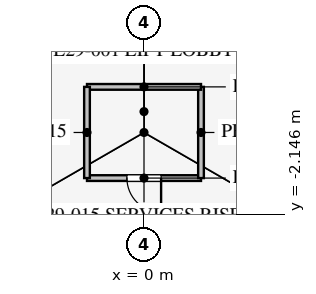
"""IFC4 building model, lengths in metres.
Left out: names, types, materials, properties, quantities, classifications, styles, units other than length and angle.
Written with IfcOpenShell. Run it as: python <this file> out.ifc"""

import sys

from ifc_helpers import new_model, si_unit, direction, frame, frame_2d, origin, place, context, subcontext, project, spatial, rectangle, extrude, element, fill, save


model = new_model("IFC4")
c1 = context("Model", 3, precision=1e-05, world=origin(), true_north=direction((0.0, 1.0)))
c2 = subcontext(c1, "Body", "Model", "MODEL_VIEW")
j1 = project(units=[si_unit("LENGTHUNIT", "METRE"), si_unit("PLANEANGLEUNIT", "RADIAN")], contexts=[c1])
p1 = place(None, origin())
s1 = spatial("IfcSite", under=j1, at=p1, CompositionType="ELEMENT")
p2 = place(p1, origin())
s2 = spatial("IfcBuilding", under=s1, at=p2, CompositionType="ELEMENT")
p3 = place(p2, frame((0.0, 0.0, 128.3)))
s3 = spatial("IfcBuildingStorey", under=s2, at=p3, CompositionType="ELEMENT", Elevation=128.3)
p4 = place(p3, frame((-1.5, -1.2, 0.0), z_axis=(0.0, 0.0, 1.0), x_axis=(1.0, 0.0, 0.0)))
e1 = element("IfcWall", 1, at=p4, inside=s3, PredefinedType="PARTITIONING", context=c2, shape_type="SweptSolid", body=[
    extrude(rectangle(XDim=3.0, YDim=0.15, at=frame_2d((1.5, 0.0))), origin(), (0.0, 0.0, 1.0), 4.0),
])
p5 = place(p4, frame((1.05, 0.0, 0.0)))
e2 = element("IfcOpeningElement", 2, at=p5, cuts=e1, PredefinedType="OPENING", context=c2, shape_type="SweptSolid", body=[
    extrude(rectangle(XDim=0.9, YDim=2.1, at=frame_2d((0.45, 1.05))), frame((0.0, 0.085, 0.0), z_axis=(0.0, -1.0, 0.0), x_axis=(1.0, 0.0, 0.0)), (0.0, 0.0, 1.0), 0.17),
])
p6 = place(p3, frame((1.5, -1.2, 0.0), z_axis=(0.0, 0.0, 1.0), x_axis=(0.0, 1.0, 0.0)))
e3 = element("IfcWall", 3, at=p6, inside=s3, PredefinedType="PARTITIONING", context=c2, shape_type="SweptSolid", body=[
    extrude(rectangle(XDim=2.4, YDim=0.15, at=frame_2d((1.2, 0.0))), origin(), (0.0, 0.0, 1.0), 4.0),
])
p7 = place(p3, frame((1.5, 1.2, 0.0), z_axis=(0.0, 0.0, 1.0), x_axis=(-1.0, 0.0, 0.0)))
e4 = element("IfcWall", 4, at=p7, inside=s3, PredefinedType="PARTITIONING", context=c2, shape_type="SweptSolid", body=[
    extrude(rectangle(XDim=3.0, YDim=0.15, at=frame_2d((1.5, 0.0))), origin(), (0.0, 0.0, 1.0), 4.0),
])
p8 = place(p3, frame((-1.5, 1.2, 0.0), z_axis=(0.0, 0.0, 1.0), x_axis=(0.0, -1.0, 0.0)))
e5 = element("IfcWall", 5, at=p8, inside=s3, PredefinedType="PARTITIONING", context=c2, shape_type="SweptSolid", body=[
    extrude(rectangle(XDim=2.4, YDim=0.15, at=frame_2d((1.2, 0.0))), origin(), (0.0, 0.0, 1.0), 4.0),
])
p9 = place(p3, frame((26.415, -15.231, 0.0), z_axis=(0.0, 0.0, 1.0), x_axis=(-0.50000091641, 0.866024874695, 0.0)))
e6 = element("IfcWall", 6, at=p9, inside=s3, PredefinedType="PARTITIONING", context=c2, shape_type="SweptSolid", body=[
    extrude(rectangle(XDim=52.796, YDim=0.12, at=frame_2d((26.398, 0.0))), origin(), (0.0, 0.0, 1.0), 2.9),
])
p10 = place(p9, frame((10.2, 0.0, 0.15)))
e7 = element("IfcOpeningElement", 7, at=p10, cuts=e6, PredefinedType="OPENING", context=c2, shape_type="SweptSolid", body=[
    extrude(rectangle(XDim=1.8, YDim=2.1, at=frame_2d((0.9, 1.05))), frame((0.0, 0.07, 0.0), z_axis=(0.0, -1.0, 0.0), x_axis=(1.0, 0.0, 0.0)), (0.0, 0.0, 1.0), 0.14),
])
p11 = place(p9, frame((40.8, 0.0, 0.15)))
e8 = element("IfcOpeningElement", 8, at=p11, cuts=e6, PredefinedType="OPENING", context=c2, shape_type="SweptSolid", body=[
    extrude(rectangle(XDim=1.8, YDim=2.1, at=frame_2d((0.9, 1.05))), frame((0.0, 0.07, 0.0), z_axis=(0.0, -1.0, 0.0), x_axis=(1.0, 0.0, 0.0)), (0.0, 0.0, 1.0), 0.14),
])
p12 = place(p3, frame((-0.016, 30.491, 0.0), z_axis=(0.0, 0.0, 1.0), x_axis=(-0.50000091641, -0.866024874695, 0.0)))
e9 = element("IfcWall", 9, at=p12, inside=s3, PredefinedType="PARTITIONING", context=c2, shape_type="SweptSolid", body=[
    extrude(rectangle(XDim=52.796, YDim=0.12, at=frame_2d((26.398, 0.0))), origin(), (0.0, 0.0, 1.0), 2.9),
])
p13 = place(p12, frame((10.2, 0.0, 0.15)))
e10 = element("IfcOpeningElement", 10, at=p13, cuts=e9, PredefinedType="OPENING", context=c2, shape_type="SweptSolid", body=[
    extrude(rectangle(XDim=1.8, YDim=2.1, at=frame_2d((0.9, 1.05))), frame((0.0, 0.07, 0.0), z_axis=(0.0, -1.0, 0.0), x_axis=(1.0, 0.0, 0.0)), (0.0, 0.0, 1.0), 0.14),
])
p14 = place(p12, frame((40.8, 0.0, 0.15)))
e11 = element("IfcOpeningElement", 11, at=p14, cuts=e9, PredefinedType="OPENING", context=c2, shape_type="SweptSolid", body=[
    extrude(rectangle(XDim=1.8, YDim=2.1, at=frame_2d((0.9, 1.05))), frame((0.0, 0.07, 0.0), z_axis=(0.0, -1.0, 0.0), x_axis=(1.0, 0.0, 0.0)), (0.0, 0.0, 1.0), 0.14),
])
p15 = place(p5, frame((0.9, 0.0, 0.0), z_axis=(0.0, 0.0, 1.0), x_axis=(-1.0, 0.0, 0.0)))
e12 = element("IfcDoor", 12, at=p15, inside=s3, OperationType="SINGLE_SWING_LEFT", PredefinedType="DOOR", context=c2, shape_type="SweptSolid", body=[
    extrude(rectangle(XDim=0.9, YDim=2.1, at=frame_2d((0.45, 1.05))), frame((0.0, 0.025, 0.0), z_axis=(0.0, -1.0, 0.0), x_axis=(1.0, 0.0, 0.0)), (0.0, 0.0, 1.0), 0.05),
])
fill(e2, e12)
save(model, sys.argv[1])
